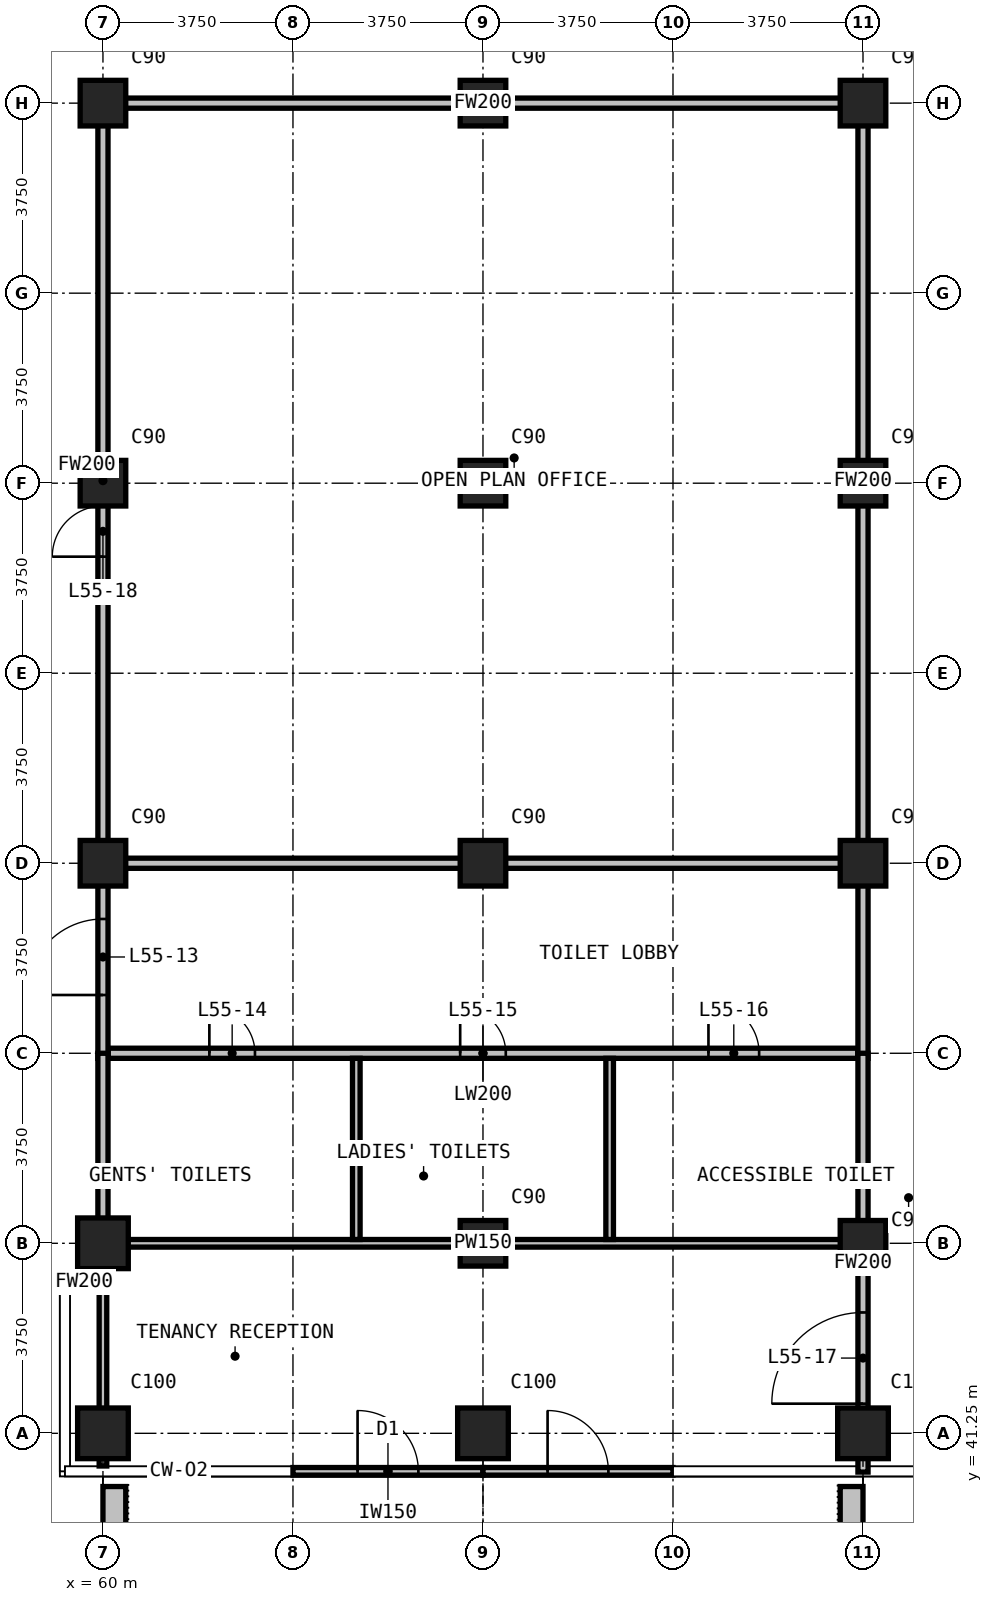
"""IFC4 building model, lengths in metres.
Left out: names, types, materials, properties, quantities, classifications, styles, units other than length and angle.
Written with IfcOpenShell. Run it as: python <this file> out.ifc"""

import sys

from ifc_helpers import new_model, si_unit, direction, frame, frame_2d, origin, origin_2d, place, context, subcontext, project, spatial, rectangle, extrude, element, fill, save


model = new_model("IFC4")
c1 = context("Model", 3, precision=1e-05, world=origin(), true_north=direction((0.0, 1.0)))
c2 = subcontext(c1, "Body", "Model", "MODEL_VIEW")
j1 = project(units=[si_unit("LENGTHUNIT", "METRE"), si_unit("PLANEANGLEUNIT", "RADIAN")], contexts=[c1])
p1 = place(None, origin())
s1 = spatial("IfcSite", under=j1, at=p1, CompositionType="ELEMENT")
p2 = place(p1, origin())
s2 = spatial("IfcBuilding", under=s1, at=p2, CompositionType="ELEMENT")
p3 = place(p2, frame((0.0, 0.0, 213.9)))
s3 = spatial("IfcBuildingStorey", under=s2, at=p3, CompositionType="ELEMENT", Elevation=213.9)
for number, where, z_axis, x_axis in (
    (1, (60.0, 41.25, 0.0), (0.0, 0.0, 1.0), (1.0, 0.0, 0.0)),
    (2, (60.0, 45.0, 0.0), (0.0, 0.0, 1.0), (1.0, 0.0, 0.0)),
):
    element("IfcColumn", number, at=place(p3, frame(where, z_axis=z_axis, x_axis=x_axis)), inside=s3, PredefinedType="COLUMN", context=c2, shape_type="SweptSolid", body=[
        extrude(rectangle(XDim=1.0, YDim=1.0, at=origin_2d()), origin(), (0.0, 0.0, 1.0), 3.6),
    ])
for number, where, z_axis, x_axis in (
    (3, (60.0, 52.5, 0.0), (0.0, 0.0, 1.0), (1.0, 0.0, 0.0)),
    (4, (60.0, 60.0, 0.0), (0.0, 0.0, 1.0), (1.0, 0.0, 0.0)),
    (5, (60.0, 67.5, 0.0), (0.0, 0.0, 1.0), (1.0, 0.0, 0.0)),
):
    element("IfcColumn", number, at=place(p3, frame(where, z_axis=z_axis, x_axis=x_axis)), inside=s3, PredefinedType="COLUMN", context=c2, shape_type="SweptSolid", body=[
        extrude(rectangle(XDim=0.9, YDim=0.9, at=origin_2d()), origin(), (0.0, 0.0, 1.0), 3.6),
    ])
p4 = place(p3, frame((67.5, 41.25, 0.0), z_axis=(0.0, 0.0, 1.0), x_axis=(1.0, 0.0, 0.0)))
e6 = element("IfcColumn", 6, at=p4, inside=s3, PredefinedType="COLUMN", context=c2, shape_type="SweptSolid", body=[
    extrude(rectangle(XDim=1.0, YDim=1.0, at=origin_2d()), origin(), (0.0, 0.0, 1.0), 3.6),
])
for number, where, z_axis, x_axis in (
    (7, (67.5, 45.0, 0.0), (0.0, 0.0, 1.0), (1.0, 0.0, 0.0)),
    (8, (67.5, 52.5, 0.0), (0.0, 0.0, 1.0), (1.0, 0.0, 0.0)),
    (9, (67.5, 60.0, 0.0), (0.0, 0.0, 1.0), (1.0, 0.0, 0.0)),
    (10, (67.5, 67.5, 0.0), (0.0, 0.0, 1.0), (1.0, 0.0, 0.0)),
):
    element("IfcColumn", number, at=place(p3, frame(where, z_axis=z_axis, x_axis=x_axis)), inside=s3, PredefinedType="COLUMN", context=c2, shape_type="SweptSolid", body=[
        extrude(rectangle(XDim=0.9, YDim=0.9, at=origin_2d()), origin(), (0.0, 0.0, 1.0), 3.6),
    ])
p5 = place(p3, frame((75.0, 41.25, 0.0), z_axis=(0.0, 0.0, 1.0), x_axis=(1.0, 0.0, 0.0)))
e11 = element("IfcColumn", 11, at=p5, inside=s3, PredefinedType="COLUMN", context=c2, shape_type="SweptSolid", body=[
    extrude(rectangle(XDim=1.0, YDim=1.0, at=origin_2d()), origin(), (0.0, 0.0, 1.0), 3.6),
])
for number, where, z_axis, x_axis in (
    (12, (75.0, 45.0, 0.0), (0.0, 0.0, 1.0), (1.0, 0.0, 0.0)),
    (13, (75.0, 52.5, 0.0), (0.0, 0.0, 1.0), (1.0, 0.0, 0.0)),
    (14, (75.0, 60.0, 0.0), (0.0, 0.0, 1.0), (1.0, 0.0, 0.0)),
    (15, (75.0, 67.5, 0.0), (0.0, 0.0, 1.0), (1.0, 0.0, 0.0)),
):
    element("IfcColumn", number, at=place(p3, frame(where, z_axis=z_axis, x_axis=x_axis)), inside=s3, PredefinedType="COLUMN", context=c2, shape_type="SweptSolid", body=[
        extrude(rectangle(XDim=0.9, YDim=0.9, at=origin_2d()), origin(), (0.0, 0.0, 1.0), 3.6),
    ])
p6 = place(p3, frame((63.75, 40.5, 0.0), z_axis=(0.0, 0.0, 1.0), x_axis=(1.0, 0.0, 0.0)))
e16 = element("IfcWall", 16, at=p6, inside=s3, PredefinedType="SOLIDWALL", context=c2, shape_type="SweptSolid", body=[
    extrude(rectangle(XDim=3.75, YDim=0.15, at=frame_2d((1.875, 0.0))), origin(), (0.0, 0.0, 1.0), 3.3),
])
p7 = place(p6, frame((1.275, 0.0, 0.0)))
e17 = element("IfcOpeningElement", 17, at=p7, cuts=e16, PredefinedType="OPENING", context=c2, shape_type="SweptSolid", body=[
    extrude(rectangle(XDim=1.2, YDim=2.4, at=frame_2d((0.6, 1.2))), frame((0.0, 0.085, 0.0), z_axis=(0.0, -1.0, 0.0), x_axis=(1.0, 0.0, 0.0)), (0.0, 0.0, 1.0), 0.17),
])
p8 = place(p3, frame((67.5, 40.5, 0.0), z_axis=(0.0, 0.0, 1.0), x_axis=(1.0, 0.0, 0.0)))
e18 = element("IfcWall", 18, at=p8, inside=s3, PredefinedType="SOLIDWALL", context=c2, shape_type="SweptSolid", body=[
    extrude(rectangle(XDim=3.75, YDim=0.15, at=frame_2d((1.875, 0.0))), origin(), (0.0, 0.0, 1.0), 3.3),
])
p9 = place(p8, frame((1.275, 0.0, 0.0)))
e19 = element("IfcOpeningElement", 19, at=p9, cuts=e18, PredefinedType="OPENING", context=c2, shape_type="SweptSolid", body=[
    extrude(rectangle(XDim=1.2, YDim=2.4, at=frame_2d((0.6, 1.2))), frame((0.0, 0.085, 0.0), z_axis=(0.0, -1.0, 0.0), x_axis=(1.0, 0.0, 0.0)), (0.0, 0.0, 1.0), 0.17),
])
for number, where, z_axis, x_axis in (
    (20, (60.225, 40.2, 0.0), (0.0, 0.0, 1.0), (0.0, -1.0, 0.0)),
    (21, (74.775, 40.2, 0.0), (0.0, 0.0, 1.0), (0.0, -1.0, 0.0)),
):
    element("IfcWall", number, at=place(p3, frame(where, z_axis=z_axis, x_axis=x_axis)), inside=s3, PredefinedType="USERDEFINED", context=c2, shape_type="SweptSolid", body=[
        extrude(rectangle(XDim=2.35, YDim=0.45, at=frame_2d((1.175, 0.0))), origin(), (0.0, 0.0, 1.0), 1.1),
    ])
p10 = place(p3, frame((60.1, 48.75, 0.0), z_axis=(0.0, 0.0, 1.0), x_axis=(1.0, 0.0, 0.0)))
e22 = element("IfcWall", 22, at=p10, inside=s3, PredefinedType="PARTITIONING", context=c2, shape_type="SweptSolid", body=[
    extrude(rectangle(XDim=14.8, YDim=0.2, at=frame_2d((7.4, 0.0))), origin(), (0.0, 0.0, 1.0), 3.3),
])
p11 = place(p10, frame((2.0, 0.0, 0.0)))
e23 = element("IfcOpeningElement", 23, at=p11, cuts=e22, PredefinedType="OPENING", context=c2, shape_type="SweptSolid", body=[
    extrude(rectangle(XDim=0.9, YDim=2.2, at=frame_2d((0.45, 1.1))), frame((0.0, 0.11, 0.0), z_axis=(0.0, -1.0, 0.0), x_axis=(1.0, 0.0, 0.0)), (0.0, 0.0, 1.0), 0.22),
])
p12 = place(p10, frame((6.95, 0.0, 0.0)))
e24 = element("IfcOpeningElement", 24, at=p12, cuts=e22, PredefinedType="OPENING", context=c2, shape_type="SweptSolid", body=[
    extrude(rectangle(XDim=0.9, YDim=2.2, at=frame_2d((0.45, 1.1))), frame((0.0, 0.11, 0.0), z_axis=(0.0, -1.0, 0.0), x_axis=(1.0, 0.0, 0.0)), (0.0, 0.0, 1.0), 0.22),
])
p13 = place(p10, frame((11.85, 0.0, 0.0)))
e25 = element("IfcOpeningElement", 25, at=p13, cuts=e22, PredefinedType="OPENING", context=c2, shape_type="SweptSolid", body=[
    extrude(rectangle(XDim=1.0, YDim=2.2, at=frame_2d((0.5, 1.1))), frame((0.0, 0.11, 0.0), z_axis=(0.0, -1.0, 0.0), x_axis=(1.0, 0.0, 0.0)), (0.0, 0.0, 1.0), 0.22),
])
p14 = place(p3, frame((60.1, 52.5, 0.0), z_axis=(0.0, 0.0, 1.0), x_axis=(1.0, 0.0, 0.0)))
e26 = element("IfcWall", 26, at=p14, inside=s3, PredefinedType="PARTITIONING", context=c2, shape_type="SweptSolid", body=[
    extrude(rectangle(XDim=14.8, YDim=0.2, at=frame_2d((7.4, 0.0))), origin(), (0.0, 0.0, 1.0), 3.3),
])
p15 = place(p3, frame((60.0, 48.65, 0.0), z_axis=(0.0, 0.0, 1.0), x_axis=(0.0, 1.0, 0.0)))
e27 = element("IfcWall", 27, at=p15, inside=s3, PredefinedType="PARTITIONING", context=c2, shape_type="SweptSolid", body=[
    extrude(rectangle(XDim=3.95, YDim=0.2, at=frame_2d((1.975, 0.0))), origin(), (0.0, 0.0, 1.0), 3.3),
])
p16 = place(p15, frame((1.25, 0.0, 0.0)))
e28 = element("IfcOpeningElement", 28, at=p16, cuts=e27, PredefinedType="OPENING", context=c2, shape_type="SweptSolid", body=[
    extrude(rectangle(XDim=1.5, YDim=2.2, at=frame_2d((0.75, 1.1))), frame((0.0, 0.11, 0.0), z_axis=(0.0, -1.0, 0.0), x_axis=(1.0, 0.0, 0.0)), (0.0, 0.0, 1.0), 0.22),
])
p17 = place(p3, frame((75.0, 48.65, 0.0), z_axis=(0.0, 0.0, 1.0), x_axis=(0.0, 1.0, 0.0)))
e29 = element("IfcWall", 29, at=p17, inside=s3, PredefinedType="PARTITIONING", context=c2, shape_type="SweptSolid", body=[
    extrude(rectangle(XDim=3.95, YDim=0.2, at=frame_2d((1.975, 0.0))), origin(), (0.0, 0.0, 1.0), 3.3),
])
p18 = place(p3, frame((59.355, 44.235, 0.0), z_axis=(0.0, 0.0, 1.0), x_axis=(1.0, 0.0, 0.0)))
e30 = element("IfcWall", 30, at=p18, inside=s3, PredefinedType="PARTITIONING", context=c2, shape_type="SweptSolid", body=[
    extrude(rectangle(XDim=0.545, YDim=0.2, at=frame_2d((0.272, 0.0))), origin(), (0.0, 0.0, 1.0), 3.3),
])
p19 = place(p3, frame((60.1, 67.5, 0.0), z_axis=(0.0, 0.0, 1.0), x_axis=(1.0, 0.0, 0.0)))
e31 = element("IfcWall", 31, at=p19, inside=s3, PredefinedType="PARTITIONING", context=c2, shape_type="SweptSolid", body=[
    extrude(rectangle(XDim=14.8, YDim=0.2, at=frame_2d((7.4, 0.0))), origin(), (0.0, 0.0, 1.0), 3.3),
])
p20 = place(p3, frame((60.0, 44.135, 0.0), z_axis=(0.0, 0.0, 1.0), x_axis=(0.0, 1.0, 0.0)))
e32 = element("IfcWall", 32, at=p20, inside=s3, PredefinedType="PARTITIONING", context=c2, shape_type="SweptSolid", body=[
    extrude(rectangle(XDim=4.615, YDim=0.2, at=frame_2d((2.308, 0.0))), origin(), (0.0, 0.0, 1.0), 3.3),
])
p21 = place(p3, frame((60.0, 52.5, 0.0), z_axis=(0.0, 0.0, 1.0), x_axis=(0.0, 1.0, 0.0)))
e33 = element("IfcWall", 33, at=p21, inside=s3, PredefinedType="PARTITIONING", context=c2, shape_type="SweptSolid", body=[
    extrude(rectangle(XDim=15.1, YDim=0.2, at=frame_2d((7.55, 0.0))), origin(), (0.0, 0.0, 1.0), 3.3),
])
p22 = place(p21, frame((6.05, 0.0, 0.0)))
e34 = element("IfcOpeningElement", 34, at=p22, cuts=e33, PredefinedType="OPENING", context=c2, shape_type="SweptSolid", body=[
    extrude(rectangle(XDim=1.0, YDim=2.2, at=frame_2d((0.5, 1.1))), frame((0.0, 0.11, 0.0), z_axis=(0.0, -1.0, 0.0), x_axis=(1.0, 0.0, 0.0)), (0.0, 0.0, 1.0), 0.22),
])
p23 = place(p3, frame((75.0, 40.485, 0.0), z_axis=(0.0, 0.0, 1.0), x_axis=(0.0, 1.0, 0.0)))
e35 = element("IfcWall", 35, at=p23, inside=s3, PredefinedType="PARTITIONING", context=c2, shape_type="SweptSolid", body=[
    extrude(rectangle(XDim=8.265, YDim=0.2, at=frame_2d((4.132, 0.0))), origin(), (0.0, 0.0, 1.0), 3.3),
])
p24 = place(p23, frame((1.35, 0.0, 0.0)))
e36 = element("IfcOpeningElement", 36, at=p24, cuts=e35, PredefinedType="OPENING", context=c2, shape_type="SweptSolid", body=[
    extrude(rectangle(XDim=1.8, YDim=2.2, at=frame_2d((0.9, 1.1))), frame((0.0, 0.11, 0.0), z_axis=(0.0, -1.0, 0.0), x_axis=(1.0, 0.0, 0.0)), (0.0, 0.0, 1.0), 0.22),
])
p25 = place(p3, frame((75.0, 52.5, 0.0), z_axis=(0.0, 0.0, 1.0), x_axis=(0.0, 1.0, 0.0)))
e37 = element("IfcWall", 37, at=p25, inside=s3, PredefinedType="PARTITIONING", context=c2, shape_type="SweptSolid", body=[
    extrude(rectangle(XDim=15.1, YDim=0.2, at=frame_2d((7.55, 0.0))), origin(), (0.0, 0.0, 1.0), 3.3),
])
p26 = place(p3, frame((60.1, 45.0, 0.0), z_axis=(0.0, 0.0, 1.0), x_axis=(1.0, 0.0, 0.0)))
e38 = element("IfcWall", 38, at=p26, inside=s3, PredefinedType="PARTITIONING", context=c2, shape_type="SweptSolid", body=[
    extrude(rectangle(XDim=14.8, YDim=0.15, at=frame_2d((7.4, 0.0))), origin(), (0.0, 0.0, 1.0), 3.3),
])
p27 = place(p3, frame((60.0, 40.605, 0.0), z_axis=(0.0, 0.0, 1.0), x_axis=(0.0, 1.0, 0.0)))
e39 = element("IfcWall", 39, at=p27, inside=s3, PredefinedType="PARTITIONING", context=c2, shape_type="SweptSolid", body=[
    extrude(rectangle(XDim=3.6, YDim=0.15, at=frame_2d((1.8, 0.0))), origin(), (0.0, 0.0, 1.0), 3.3),
])
for number, where, z_axis, x_axis in (
    (40, (65.0, 45.075, 0.0), (0.0, 0.0, 1.0), (0.0, 1.0, 0.0)),
    (41, (70.0, 45.075, 0.0), (0.0, 0.0, 1.0), (0.0, 1.0, 0.0)),
):
    element("IfcWall", number, at=place(p3, frame(where, z_axis=z_axis, x_axis=x_axis)), inside=s3, PredefinedType="PARTITIONING", context=c2, shape_type="SweptSolid", body=[
        extrude(rectangle(XDim=3.575, YDim=0.15, at=frame_2d((1.788, 0.0))), origin(), (0.0, 0.0, 1.0), 3.3),
    ])
p28 = place(p7, origin())
e42 = element("IfcDoor", 42, at=p28, inside=s3, OperationType="SINGLE_SWING_LEFT", PredefinedType="DOOR", context=c2, shape_type="SweptSolid", body=[
    extrude(rectangle(XDim=1.2, YDim=2.4, at=frame_2d((0.6, 1.2))), frame((0.0, 0.025, 0.0), z_axis=(0.0, -1.0, 0.0), x_axis=(1.0, 0.0, 0.0)), (0.0, 0.0, 1.0), 0.05),
])
fill(e17, e42)
p29 = place(p9, origin())
e43 = element("IfcDoor", 43, at=p29, inside=s3, OperationType="SINGLE_SWING_LEFT", PredefinedType="DOOR", context=c2, shape_type="SweptSolid", body=[
    extrude(rectangle(XDim=1.2, YDim=2.4, at=frame_2d((0.6, 1.2))), frame((0.0, 0.025, 0.0), z_axis=(0.0, -1.0, 0.0), x_axis=(1.0, 0.0, 0.0)), (0.0, 0.0, 1.0), 0.05),
])
fill(e19, e43)
p30 = place(p16, origin())
e44 = element("IfcDoor", 44, at=p30, inside=s3, OperationType="DOUBLE_DOOR_SINGLE_SWING", PredefinedType="DOOR", context=c2, shape_type="SweptSolid", body=[
    extrude(rectangle(XDim=1.5, YDim=2.2, at=frame_2d((0.75, 1.1))), frame((0.0, 0.025, 0.0), z_axis=(0.0, -1.0, 0.0), x_axis=(1.0, 0.0, 0.0)), (0.0, 0.0, 1.0), 0.05),
])
fill(e28, e44)
p31 = place(p11, origin())
e45 = element("IfcDoor", 45, at=p31, inside=s3, OperationType="SINGLE_SWING_LEFT", PredefinedType="DOOR", context=c2, shape_type="SweptSolid", body=[
    extrude(rectangle(XDim=0.9, YDim=2.2, at=frame_2d((0.45, 1.1))), frame((0.0, 0.025, 0.0), z_axis=(0.0, -1.0, 0.0), x_axis=(1.0, 0.0, 0.0)), (0.0, 0.0, 1.0), 0.05),
])
fill(e23, e45)
p32 = place(p12, origin())
e46 = element("IfcDoor", 46, at=p32, inside=s3, OperationType="SINGLE_SWING_LEFT", PredefinedType="DOOR", context=c2, shape_type="SweptSolid", body=[
    extrude(rectangle(XDim=0.9, YDim=2.2, at=frame_2d((0.45, 1.1))), frame((0.0, 0.025, 0.0), z_axis=(0.0, -1.0, 0.0), x_axis=(1.0, 0.0, 0.0)), (0.0, 0.0, 1.0), 0.05),
])
fill(e24, e46)
p33 = place(p13, origin())
e47 = element("IfcDoor", 47, at=p33, inside=s3, OperationType="SINGLE_SWING_LEFT", PredefinedType="DOOR", context=c2, shape_type="SweptSolid", body=[
    extrude(rectangle(XDim=1.0, YDim=2.2, at=frame_2d((0.5, 1.1))), frame((0.0, 0.025, 0.0), z_axis=(0.0, -1.0, 0.0), x_axis=(1.0, 0.0, 0.0)), (0.0, 0.0, 1.0), 0.05),
])
fill(e25, e47)
p34 = place(p24, origin())
e48 = element("IfcDoor", 48, at=p34, inside=s3, OperationType="DOUBLE_DOOR_SINGLE_SWING", PredefinedType="DOOR", context=c2, shape_type="SweptSolid", body=[
    extrude(rectangle(XDim=1.8, YDim=2.2, at=frame_2d((0.9, 1.1))), frame((0.0, 0.025, 0.0), z_axis=(0.0, -1.0, 0.0), x_axis=(1.0, 0.0, 0.0)), (0.0, 0.0, 1.0), 0.05),
])
fill(e36, e48)
p35 = place(p22, origin())
e49 = element("IfcDoor", 49, at=p35, inside=s3, OperationType="SINGLE_SWING_RIGHT", PredefinedType="DOOR", context=c2, shape_type="SweptSolid", body=[
    extrude(rectangle(XDim=1.0, YDim=2.2, at=frame_2d((0.5, 1.1))), frame((0.0, 0.025, 0.0), z_axis=(0.0, -1.0, 0.0), x_axis=(1.0, 0.0, 0.0)), (0.0, 0.0, 1.0), 0.05),
])
fill(e34, e49)
save(model, sys.argv[1])
